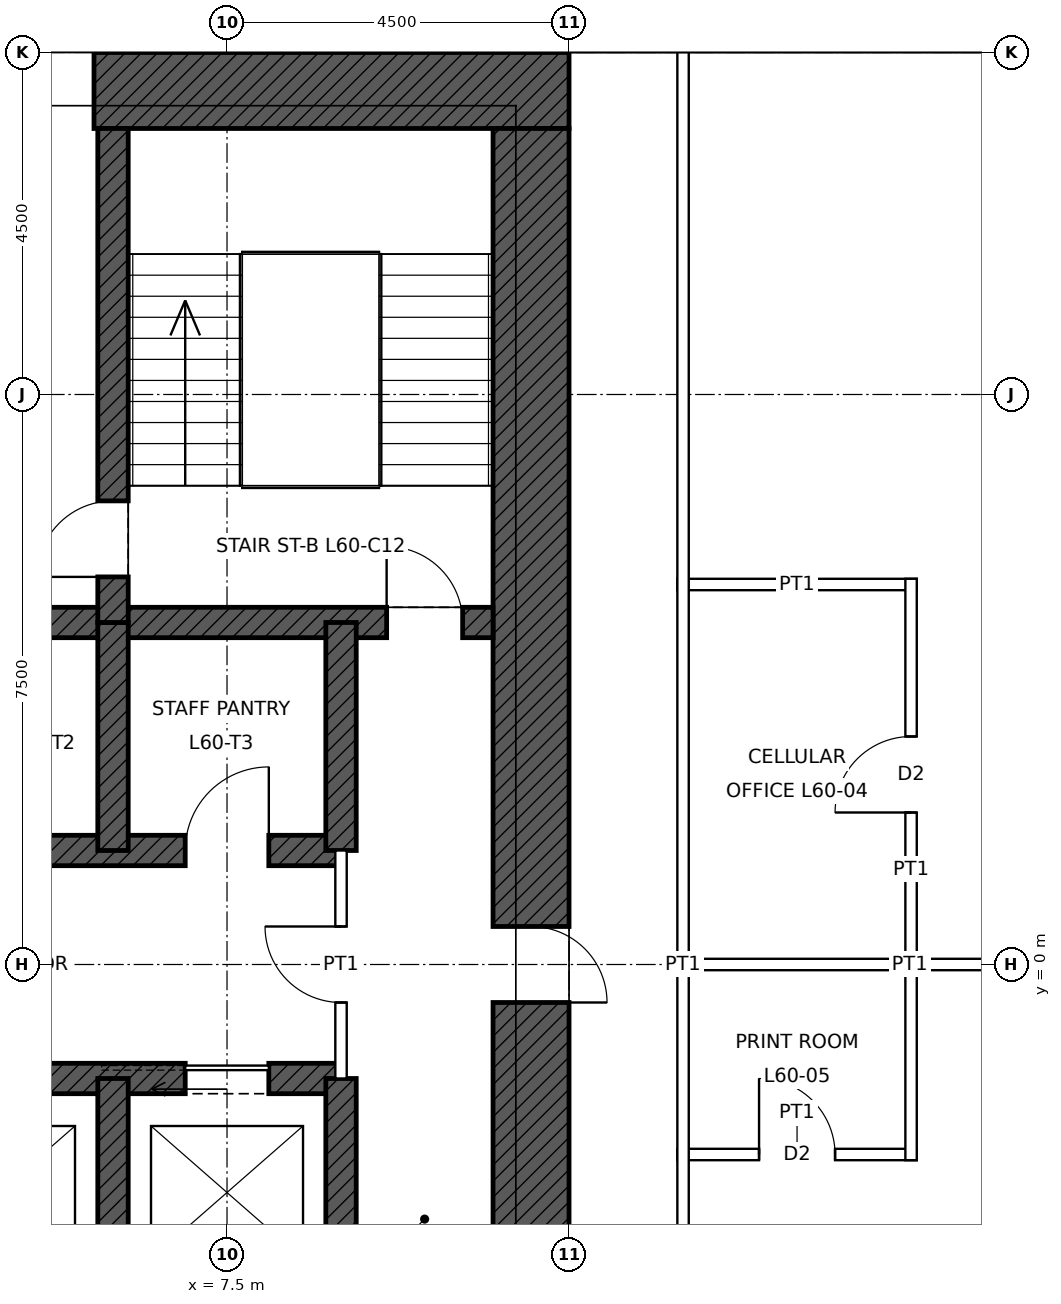
"""IFC4 building model, lengths in metres.
Left out: names, types, materials, properties, quantities, classifications, styles, units other than length and angle.
Written with IfcOpenShell. Run it as: python <this file> out.ifc"""

import sys

from ifc_helpers import new_model, si_unit, direction, frame, frame_2d, origin, place, context, subcontext, project, spatial, rectangle, extrude, element, fill, save


model = new_model("IFC4")
c1 = context("Model", 3, precision=1e-05, world=origin(), true_north=direction((0.0, 1.0)))
c2 = subcontext(c1, "Body", "Model", "MODEL_VIEW")
j1 = project(units=[si_unit("LENGTHUNIT", "METRE"), si_unit("PLANEANGLEUNIT", "RADIAN")], contexts=[c1])
p1 = place(None, origin())
s1 = spatial("IfcSite", under=j1, at=p1, CompositionType="ELEMENT")
p2 = place(p1, origin())
s2 = spatial("IfcBuilding", under=s1, at=p2, CompositionType="ELEMENT")
p3 = place(p2, frame((0.0, 0.0, 275.9)))
s3 = spatial("IfcBuildingStorey", under=s2, at=p3, CompositionType="ELEMENT", Elevation=275.9)
p4 = place(p3, frame((-12.0, 11.5, 0.0), z_axis=(0.0, 0.0, 1.0), x_axis=(1.0, 0.0, 0.0)))
e1 = element("IfcWall", 1, at=p4, inside=s3, PredefinedType="SHEAR", context=c2, shape_type="SweptSolid", body=[
    extrude(rectangle(XDim=24.0, YDim=1.0, at=frame_2d((12.0, 0.0))), origin(), (0.0, 0.0, 1.0), 4.0),
])
p5 = place(p4, frame((6.25, 0.0, 0.0)))
e2 = element("IfcOpeningElement", 2, at=p5, cuts=e1, PredefinedType="OPENING", context=c2, shape_type="SweptSolid", body=[
    extrude(rectangle(XDim=1.0, YDim=2.4, at=frame_2d((0.5, 1.2))), frame((0.0, 0.51, 0.0), z_axis=(0.0, -1.0, 0.0), x_axis=(1.0, 0.0, 0.0)), (0.0, 0.0, 1.0), 1.02),
])
p6 = place(p4, frame((16.75, 0.0, 0.0)))
e3 = element("IfcOpeningElement", 3, at=p6, cuts=e1, PredefinedType="OPENING", context=c2, shape_type="SweptSolid", body=[
    extrude(rectangle(XDim=1.0, YDim=2.4, at=frame_2d((0.5, 1.2))), frame((0.0, 0.51, 0.0), z_axis=(0.0, -1.0, 0.0), x_axis=(1.0, 0.0, 0.0)), (0.0, 0.0, 1.0), 1.02),
])
p7 = place(p3, frame((11.5, 11.0, 0.0), z_axis=(0.0, 0.0, 1.0), x_axis=(0.0, -1.0, 0.0)))
e4 = element("IfcWall", 4, at=p7, inside=s3, PredefinedType="SHEAR", context=c2, shape_type="SweptSolid", body=[
    extrude(rectangle(XDim=22.0, YDim=1.0, at=frame_2d((11.0, 0.0))), origin(), (0.0, 0.0, 1.0), 4.0),
])
p8 = place(p7, frame((10.5, 0.0, 0.0)))
e5 = element("IfcOpeningElement", 5, at=p8, cuts=e4, PredefinedType="OPENING", context=c2, shape_type="SweptSolid", body=[
    extrude(rectangle(XDim=1.0, YDim=2.4, at=frame_2d((0.5, 1.2))), frame((0.0, 0.51, 0.0), z_axis=(0.0, -1.0, 0.0), x_axis=(1.0, 0.0, 0.0)), (0.0, 0.0, 1.0), 1.02),
])
p9 = place(p3, frame((-11.0, 4.5, 0.0), z_axis=(0.0, 0.0, 1.0), x_axis=(1.0, 0.0, 0.0)))
e6 = element("IfcWall", 6, at=p9, inside=s3, PredefinedType="SHEAR", context=c2, shape_type="SweptSolid", body=[
    extrude(rectangle(XDim=22.0, YDim=0.4, at=frame_2d((11.0, 0.0))), origin(), (0.0, 0.0, 1.0), 4.0),
])
p10 = place(p9, frame((0.4, 0.0, 0.0)))
e7 = element("IfcOpeningElement", 7, at=p10, cuts=e6, PredefinedType="OPENING", context=c2, shape_type="SweptSolid", body=[
    extrude(rectangle(XDim=1.0, YDim=2.1, at=frame_2d((0.5, 1.05))), frame((0.0, 0.21, 0.0), z_axis=(0.0, -1.0, 0.0), x_axis=(1.0, 0.0, 0.0)), (0.0, 0.0, 1.0), 0.42),
])
p11 = place(p9, frame((20.6, 0.0, 0.0)))
e8 = element("IfcOpeningElement", 8, at=p11, cuts=e6, PredefinedType="OPENING", context=c2, shape_type="SweptSolid", body=[
    extrude(rectangle(XDim=1.0, YDim=2.1, at=frame_2d((0.5, 1.05))), frame((0.0, 0.21, 0.0), z_axis=(0.0, -1.0, 0.0), x_axis=(1.0, 0.0, 0.0)), (0.0, 0.0, 1.0), 0.42),
])
p12 = place(p3, frame((-9.0, 1.5, 0.0), z_axis=(0.0, 0.0, 1.0), x_axis=(1.0, 0.0, 0.0)))
e9 = element("IfcWall", 9, at=p12, inside=s3, PredefinedType="SHEAR", context=c2, shape_type="SweptSolid", body=[
    extrude(rectangle(XDim=18.0, YDim=0.4, at=frame_2d((9.0, 0.0))), origin(), (0.0, 0.0, 1.0), 4.0),
])
p13 = place(p12, frame((0.95, 0.0, 0.0)))
e10 = element("IfcOpeningElement", 10, at=p13, cuts=e9, PredefinedType="OPENING", context=c2, shape_type="SweptSolid", body=[
    extrude(rectangle(XDim=1.1, YDim=2.1, at=frame_2d((0.55, 1.05))), frame((0.0, 0.21, 0.0), z_axis=(0.0, -1.0, 0.0), x_axis=(1.0, 0.0, 0.0)), (0.0, 0.0, 1.0), 0.42),
])
p14 = place(p12, frame((3.95, 0.0, 0.0)))
e11 = element("IfcOpeningElement", 11, at=p14, cuts=e9, PredefinedType="OPENING", context=c2, shape_type="SweptSolid", body=[
    extrude(rectangle(XDim=1.1, YDim=2.1, at=frame_2d((0.55, 1.05))), frame((0.0, 0.21, 0.0), z_axis=(0.0, -1.0, 0.0), x_axis=(1.0, 0.0, 0.0)), (0.0, 0.0, 1.0), 0.42),
])
p15 = place(p12, frame((6.95, 0.0, 0.0)))
e12 = element("IfcOpeningElement", 12, at=p15, cuts=e9, PredefinedType="OPENING", context=c2, shape_type="SweptSolid", body=[
    extrude(rectangle(XDim=1.1, YDim=2.1, at=frame_2d((0.55, 1.05))), frame((0.0, 0.21, 0.0), z_axis=(0.0, -1.0, 0.0), x_axis=(1.0, 0.0, 0.0)), (0.0, 0.0, 1.0), 0.42),
])
p16 = place(p12, frame((9.95, 0.0, 0.0)))
e13 = element("IfcOpeningElement", 13, at=p16, cuts=e9, PredefinedType="OPENING", context=c2, shape_type="SweptSolid", body=[
    extrude(rectangle(XDim=1.1, YDim=2.1, at=frame_2d((0.55, 1.05))), frame((0.0, 0.21, 0.0), z_axis=(0.0, -1.0, 0.0), x_axis=(1.0, 0.0, 0.0)), (0.0, 0.0, 1.0), 0.42),
])
p17 = place(p12, frame((12.95, 0.0, 0.0)))
e14 = element("IfcOpeningElement", 14, at=p17, cuts=e9, PredefinedType="OPENING", context=c2, shape_type="SweptSolid", body=[
    extrude(rectangle(XDim=1.1, YDim=2.1, at=frame_2d((0.55, 1.05))), frame((0.0, 0.21, 0.0), z_axis=(0.0, -1.0, 0.0), x_axis=(1.0, 0.0, 0.0)), (0.0, 0.0, 1.0), 0.42),
])
p18 = place(p12, frame((15.95, 0.0, 0.0)))
e15 = element("IfcOpeningElement", 15, at=p18, cuts=e9, PredefinedType="OPENING", context=c2, shape_type="SweptSolid", body=[
    extrude(rectangle(XDim=1.1, YDim=2.1, at=frame_2d((0.55, 1.05))), frame((0.0, 0.21, 0.0), z_axis=(0.0, -1.0, 0.0), x_axis=(1.0, 0.0, 0.0)), (0.0, 0.0, 1.0), 0.42),
])
p19 = place(p3, frame((-9.0, -1.5, 0.0), z_axis=(0.0, 0.0, 1.0), x_axis=(1.0, 0.0, 0.0)))
e16 = element("IfcWall", 16, at=p19, inside=s3, PredefinedType="SHEAR", context=c2, shape_type="SweptSolid", body=[
    extrude(rectangle(XDim=18.0, YDim=0.4, at=frame_2d((9.0, 0.0))), origin(), (0.0, 0.0, 1.0), 4.0),
])
p20 = place(p19, frame((9.95, 0.0, 0.0)))
e17 = element("IfcOpeningElement", 17, at=p20, cuts=e16, PredefinedType="OPENING", context=c2, shape_type="SweptSolid", body=[
    extrude(rectangle(XDim=1.1, YDim=2.1, at=frame_2d((0.55, 1.05))), frame((0.0, 0.21, 0.0), z_axis=(0.0, -1.0, 0.0), x_axis=(1.0, 0.0, 0.0)), (0.0, 0.0, 1.0), 0.42),
])
p21 = place(p19, frame((12.95, 0.0, 0.0)))
e18 = element("IfcOpeningElement", 18, at=p21, cuts=e16, PredefinedType="OPENING", context=c2, shape_type="SweptSolid", body=[
    extrude(rectangle(XDim=1.1, YDim=2.1, at=frame_2d((0.55, 1.05))), frame((0.0, 0.21, 0.0), z_axis=(0.0, -1.0, 0.0), x_axis=(1.0, 0.0, 0.0)), (0.0, 0.0, 1.0), 0.42),
])
p22 = place(p19, frame((15.95, 0.0, 0.0)))
e19 = element("IfcOpeningElement", 19, at=p22, cuts=e16, PredefinedType="OPENING", context=c2, shape_type="SweptSolid", body=[
    extrude(rectangle(XDim=1.1, YDim=2.1, at=frame_2d((0.55, 1.05))), frame((0.0, 0.21, 0.0), z_axis=(0.0, -1.0, 0.0), x_axis=(1.0, 0.0, 0.0)), (0.0, 0.0, 1.0), 0.42),
])
p23 = place(p19, frame((0.95, 0.0, 0.0)))
e20 = element("IfcOpeningElement", 20, at=p23, cuts=e16, PredefinedType="OPENING", context=c2, shape_type="SweptSolid", body=[
    extrude(rectangle(XDim=1.1, YDim=2.1, at=frame_2d((0.55, 1.05))), frame((0.0, 0.21, 0.0), z_axis=(0.0, -1.0, 0.0), x_axis=(1.0, 0.0, 0.0)), (0.0, 0.0, 1.0), 0.42),
])
p24 = place(p19, frame((3.95, 0.0, 0.0)))
e21 = element("IfcOpeningElement", 21, at=p24, cuts=e16, PredefinedType="OPENING", context=c2, shape_type="SweptSolid", body=[
    extrude(rectangle(XDim=1.1, YDim=2.1, at=frame_2d((0.55, 1.05))), frame((0.0, 0.21, 0.0), z_axis=(0.0, -1.0, 0.0), x_axis=(1.0, 0.0, 0.0)), (0.0, 0.0, 1.0), 0.42),
])
p25 = place(p19, frame((6.95, 0.0, 0.0)))
e22 = element("IfcOpeningElement", 22, at=p25, cuts=e16, PredefinedType="OPENING", context=c2, shape_type="SweptSolid", body=[
    extrude(rectangle(XDim=1.1, YDim=2.1, at=frame_2d((0.55, 1.05))), frame((0.0, 0.21, 0.0), z_axis=(0.0, -1.0, 0.0), x_axis=(1.0, 0.0, 0.0)), (0.0, 0.0, 1.0), 0.42),
])
for number, where, z_axis, x_axis in (
    (23, (9.0, 1.5, 0.0), (0.0, 0.0, 1.0), (0.0, 1.0, 0.0)),
    (24, (9.0, -4.5, 0.0), (0.0, 0.0, 1.0), (0.0, 1.0, 0.0)),
    (25, (6.0, 1.5, 0.0), (0.0, 0.0, 1.0), (0.0, 1.0, 0.0)),
    (26, (6.0, -4.5, 0.0), (0.0, 0.0, 1.0), (0.0, 1.0, 0.0)),
):
    element("IfcWall", number, at=place(p3, frame(where, z_axis=z_axis, x_axis=x_axis)), inside=s3, PredefinedType="SHEAR", context=c2, shape_type="SweptSolid", body=[
        extrude(rectangle(XDim=3.0, YDim=0.4, at=frame_2d((1.5, 0.0))), origin(), (0.0, 0.0, 1.0), 4.0),
    ])
p26 = place(p3, frame((6.0, 4.5, 0.0), z_axis=(0.0, 0.0, 1.0), x_axis=(0.0, 1.0, 0.0)))
e27 = element("IfcWall", 27, at=p26, inside=s3, PredefinedType="SHEAR", context=c2, shape_type="SweptSolid", body=[
    extrude(rectangle(XDim=6.5, YDim=0.4, at=frame_2d((3.25, 0.0))), origin(), (0.0, 0.0, 1.0), 4.0),
])
p27 = place(p26, frame((0.6, 0.0, 0.0)))
e28 = element("IfcOpeningElement", 28, at=p27, cuts=e27, PredefinedType="OPENING", context=c2, shape_type="SweptSolid", body=[
    extrude(rectangle(XDim=1.0, YDim=2.1, at=frame_2d((0.5, 1.05))), frame((0.0, 0.21, 0.0), z_axis=(0.0, -1.0, 0.0), x_axis=(1.0, 0.0, 0.0)), (0.0, 0.0, 1.0), 0.42),
])
p28 = place(p3, frame((13.425, -2.5, 0.0), z_axis=(0.0, 0.0, 1.0), x_axis=(1.0, 0.0, 0.0)))
e29 = element("IfcWall", 29, at=p28, inside=s3, PredefinedType="PARTITIONING", context=c2, shape_type="SweptSolid", body=[
    extrude(rectangle(XDim=3.15, YDim=0.15, at=frame_2d((1.575, 0.0))), origin(), (0.0, 0.0, 1.0), 3.85),
])
p29 = place(p28, frame((1.075, 0.0, 0.0)))
e30 = element("IfcOpeningElement", 30, at=p29, cuts=e29, PredefinedType="OPENING", context=c2, shape_type="SweptSolid", body=[
    extrude(rectangle(XDim=1.0, YDim=2.1, at=frame_2d((0.5, 1.05))), frame((0.0, 0.085, 0.0), z_axis=(0.0, -1.0, 0.0), x_axis=(1.0, 0.0, 0.0)), (0.0, 0.0, 1.0), 0.17),
])
p30 = place(p3, frame((13.425, 0.0, 0.0), z_axis=(0.0, 0.0, 1.0), x_axis=(1.0, 0.0, 0.0)))
e31 = element("IfcWall", 31, at=p30, inside=s3, PredefinedType="PARTITIONING", context=c2, shape_type="SweptSolid", body=[
    extrude(rectangle(XDim=6.115, YDim=0.15, at=frame_2d((3.058, 0.0))), origin(), (0.0, 0.0, 1.0), 3.243),
])
p31 = place(p3, frame((13.425, 5.0, 0.0), z_axis=(0.0, 0.0, 1.0), x_axis=(1.0, 0.0, 0.0)))
e32 = element("IfcWall", 32, at=p31, inside=s3, PredefinedType="PARTITIONING", context=c2, shape_type="SweptSolid", body=[
    extrude(rectangle(XDim=3.15, YDim=0.15, at=frame_2d((1.575, 0.0))), origin(), (0.0, 0.0, 1.0), 3.85),
])
p32 = place(p3, frame((13.5, -13.575, 0.0), z_axis=(0.0, 0.0, 1.0), x_axis=(0.0, 1.0, 0.0)))
e33 = element("IfcWall", 33, at=p32, inside=s3, PredefinedType="PARTITIONING", context=c2, shape_type="SweptSolid", body=[
    extrude(rectangle(XDim=27.15, YDim=0.15, at=frame_2d((13.575, 0.0))), origin(), (0.0, 0.0, 1.0), 3.85),
])
p33 = place(p3, frame((16.5, -2.575, 0.0), z_axis=(0.0, 0.0, 1.0), x_axis=(0.0, 1.0, 0.0)))
e34 = element("IfcWall", 34, at=p33, inside=s3, PredefinedType="PARTITIONING", context=c2, shape_type="SweptSolid", body=[
    extrude(rectangle(XDim=7.65, YDim=0.15, at=frame_2d((3.825, 0.0))), origin(), (0.0, 0.0, 1.0), 3.85),
])
p34 = place(p33, frame((4.575, 0.0, 0.0)))
e35 = element("IfcOpeningElement", 35, at=p34, cuts=e34, PredefinedType="OPENING", context=c2, shape_type="SweptSolid", body=[
    extrude(rectangle(XDim=1.0, YDim=2.1, at=frame_2d((0.5, 1.05))), frame((0.0, 0.085, 0.0), z_axis=(0.0, -1.0, 0.0), x_axis=(1.0, 0.0, 0.0)), (0.0, 0.0, 1.0), 0.17),
])
p35 = place(p3, frame((9.0, -1.5, 0.0), z_axis=(0.0, 0.0, 1.0), x_axis=(0.0, 1.0, 0.0)))
e36 = element("IfcWall", 36, at=p35, inside=s3, PredefinedType="PARTITIONING", context=c2, shape_type="SweptSolid", body=[
    extrude(rectangle(XDim=3.0, YDim=0.15, at=frame_2d((1.5, 0.0))), origin(), (0.0, 0.0, 1.0), 3.75),
])
p36 = place(p35, frame((1.0, 0.0, 0.0)))
e37 = element("IfcOpeningElement", 37, at=p36, cuts=e36, PredefinedType="OPENING", context=c2, shape_type="SweptSolid", body=[
    extrude(rectangle(XDim=1.0, YDim=2.4, at=frame_2d((0.5, 1.2))), frame((0.0, 0.085, 0.0), z_axis=(0.0, -1.0, 0.0), x_axis=(1.0, 0.0, 0.0)), (0.0, 0.0, 1.0), 0.17),
])
p37 = place(p11, origin())
e38 = element("IfcDoor", 38, at=p37, inside=s3, OperationType="SINGLE_SWING_LEFT", PredefinedType="DOOR", context=c2, shape_type="SweptSolid", body=[
    extrude(rectangle(XDim=1.0, YDim=2.1, at=frame_2d((0.5, 1.05))), frame((0.0, 0.025, 0.0), z_axis=(0.0, -1.0, 0.0), x_axis=(1.0, 0.0, 0.0)), (0.0, 0.0, 1.0), 0.05),
])
fill(e8, e38)
p38 = place(p27, origin())
e39 = element("IfcDoor", 39, at=p38, inside=s3, OperationType="SINGLE_SWING_LEFT", PredefinedType="DOOR", context=c2, shape_type="SweptSolid", body=[
    extrude(rectangle(XDim=1.0, YDim=2.1, at=frame_2d((0.5, 1.05))), frame((0.0, 0.025, 0.0), z_axis=(0.0, -1.0, 0.0), x_axis=(1.0, 0.0, 0.0)), (0.0, 0.0, 1.0), 0.05),
])
fill(e28, e39)
p39 = place(p6, origin())
e40 = element("IfcDoor", 40, at=p39, inside=s3, OperationType="SINGLE_SWING_RIGHT", PredefinedType="DOOR", context=c2, shape_type="SweptSolid", body=[
    extrude(rectangle(XDim=1.0, YDim=2.4, at=frame_2d((0.5, 1.2))), frame((0.0, 0.485, 0.0), z_axis=(0.0, -1.0, 0.0), x_axis=(1.0, 0.0, 0.0)), (0.0, 0.0, 1.0), 0.05),
])
fill(e3, e40)
p40 = place(p8, origin())
e41 = element("IfcDoor", 41, at=p40, inside=s3, OperationType="SINGLE_SWING_RIGHT", PredefinedType="DOOR", context=c2, shape_type="SweptSolid", body=[
    extrude(rectangle(XDim=1.0, YDim=2.4, at=frame_2d((0.5, 1.2))), frame((0.0, 0.485, 0.0), z_axis=(0.0, -1.0, 0.0), x_axis=(1.0, 0.0, 0.0)), (0.0, 0.0, 1.0), 0.05),
])
fill(e5, e41)
p41 = place(p22, origin())
e42 = element("IfcDoor", 42, at=p41, inside=s3, OperationType="SLIDING_TO_LEFT", PredefinedType="DOOR", context=c2, shape_type="SweptSolid", body=[
    extrude(rectangle(XDim=1.1, YDim=2.1, at=frame_2d((0.55, 1.05))), frame((0.0, 0.025, 0.0), z_axis=(0.0, -1.0, 0.0), x_axis=(1.0, 0.0, 0.0)), (0.0, 0.0, 1.0), 0.05),
])
fill(e19, e42)
p42 = place(p36, origin())
e43 = element("IfcDoor", 43, at=p42, inside=s3, OperationType="SINGLE_SWING_RIGHT", PredefinedType="DOOR", context=c2, shape_type="SweptSolid", body=[
    extrude(rectangle(XDim=1.0, YDim=2.4, at=frame_2d((0.5, 1.2))), frame((0.0, 0.025, 0.0), z_axis=(0.0, -1.0, 0.0), x_axis=(1.0, 0.0, 0.0)), (0.0, 0.0, 1.0), 0.05),
])
fill(e37, e43)
p43 = place(p18, origin())
e44 = element("IfcDoor", 44, at=p43, inside=s3, OperationType="SINGLE_SWING_RIGHT", PredefinedType="DOOR", context=c2, shape_type="SweptSolid", body=[
    extrude(rectangle(XDim=1.1, YDim=2.1, at=frame_2d((0.55, 1.05))), frame((0.0, 0.025, 0.0), z_axis=(0.0, -1.0, 0.0), x_axis=(1.0, 0.0, 0.0)), (0.0, 0.0, 1.0), 0.05),
])
fill(e15, e44)
p44 = place(p34, origin())
e45 = element("IfcDoor", 45, at=p44, inside=s3, OperationType="SINGLE_SWING_LEFT", PredefinedType="DOOR", context=c2, shape_type="SweptSolid", body=[
    extrude(rectangle(XDim=1.0, YDim=2.1, at=frame_2d((0.5, 1.05))), frame((0.0, 0.025, 0.0), z_axis=(0.0, -1.0, 0.0), x_axis=(1.0, 0.0, 0.0)), (0.0, 0.0, 1.0), 0.05),
])
fill(e35, e45)
p45 = place(p29, origin())
e46 = element("IfcDoor", 46, at=p45, inside=s3, OperationType="SINGLE_SWING_LEFT", PredefinedType="DOOR", context=c2, shape_type="SweptSolid", body=[
    extrude(rectangle(XDim=1.0, YDim=2.1, at=frame_2d((0.5, 1.05))), frame((0.0, 0.025, 0.0), z_axis=(0.0, -1.0, 0.0), x_axis=(1.0, 0.0, 0.0)), (0.0, 0.0, 1.0), 0.05),
])
fill(e30, e46)
save(model, sys.argv[1])
